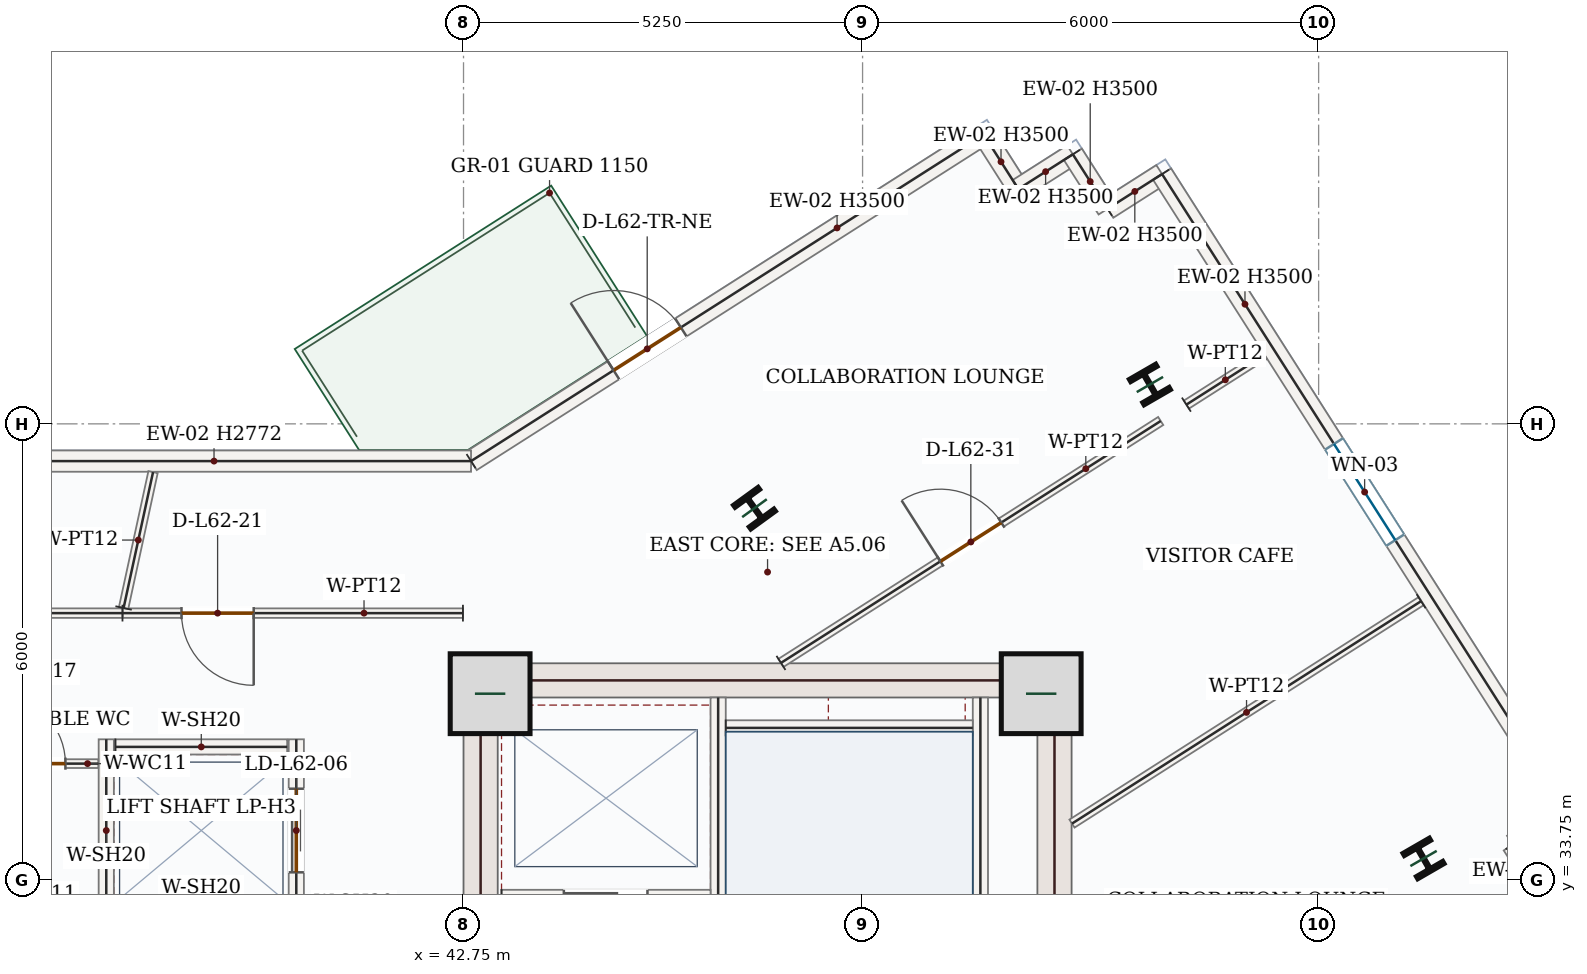
"""IFC4 building model, lengths in metres.
Left out: names, types, materials, properties, quantities, classifications, styles, units other than length and angle.
Written with IfcOpenShell. Run it as: python <this file> out.ifc"""

import sys

from ifc_helpers import new_model, si_unit, direction, frame, frame_2d, origin, origin_2d, place, context, subcontext, project, spatial, rectangle, i_section, extrude, source, transform, mapped, element, fill, save


model = new_model("IFC4")
c1 = context("Model", 3, precision=1e-05, world=origin(), true_north=direction((0.0, 1.0)))
c2 = subcontext(c1, "Body", "Model", "MODEL_VIEW")
j1 = project(units=[si_unit("LENGTHUNIT", "METRE"), si_unit("PLANEANGLEUNIT", "RADIAN")], contexts=[c1])
p1 = place(None, origin())
s1 = spatial("IfcSite", under=j1, at=p1, CompositionType="ELEMENT")
p2 = place(p1, origin())
s2 = spatial("IfcBuilding", under=s1, at=p2, CompositionType="ELEMENT")
p3 = place(p2, frame((0.0, 0.0, 261.6)))
s3 = spatial("IfcBuildingStorey", under=s2, at=p3, CompositionType="ELEMENT", Elevation=261.6)
p4 = place(p3, frame((42.975, 28.05, 0.0), z_axis=(0.0, 0.0, 1.0), x_axis=(0.0, 1.0, 0.0)))
e1 = element("IfcWall", 1, at=p4, inside=s3, PredefinedType="SHEAR", context=c2, shape_type="SweptSolid", body=[
    extrude(rectangle(XDim=8.55, YDim=0.45, at=frame_2d((4.275, 0.0))), origin(), (0.0, 0.0, 1.0), 3.5),
])
p5 = place(p4, frame((1.5, 0.0, 0.0)))
e2 = element("IfcOpeningElement", 2, at=p5, cuts=e1, PredefinedType="OPENING", context=c2, shape_type="SweptSolid", body=[
    extrude(rectangle(XDim=1.1, YDim=2.2, at=frame_2d((0.55, 1.1))), frame((0.0, 0.235, 0.0), z_axis=(0.0, -1.0, 0.0), x_axis=(1.0, 0.0, 0.0)), (0.0, 0.0, 1.0), 0.47),
])
m1 = source(origin(), c2, "Body", "SweptSolid", [
    extrude(rectangle(XDim=8.55, YDim=0.45, at=frame_2d((4.275, 0.0))), origin(), (0.0, 0.0, 1.0), 3.5),
])
p6 = place(p3, frame((50.525, 28.05, 0.0), z_axis=(0.0, 0.0, 1.0), x_axis=(0.0, 1.0, 0.0)))
e3 = element("IfcWall", 3, at=p6, inside=s3, PredefinedType="SHEAR", context=c2, shape_type="MappedRepresentation", body=[
    mapped(m1, transform((0.0, 0.0, 0.0), x_axis=(1.0, 0.0, 0.0), y_axis=(0.0, 1.0, 0.0), z_axis=(0.0, 0.0, 1.0), scale=1.0)),
])
m2 = source(origin(), c2, "Body", "SweptSolid", [
    extrude(rectangle(XDim=7.1, YDim=0.45, at=frame_2d((3.55, 0.0))), origin(), (0.0, 0.0, 1.0), 3.5),
])
p7 = place(p3, frame((43.2, 36.375, 0.0), z_axis=(0.0, 0.0, 1.0), x_axis=(1.0, 0.0, 0.0)))
e4 = element("IfcWall", 4, at=p7, inside=s3, PredefinedType="SHEAR", context=c2, shape_type="MappedRepresentation", body=[
    mapped(m2, transform((0.0, 0.0, 0.0), x_axis=(1.0, 0.0, 0.0), y_axis=(0.0, 1.0, 0.0), z_axis=(0.0, 0.0, 1.0), scale=1.0)),
])
m3 = source(origin(), c2, "Body", "SweptSolid", [
    extrude(rectangle(XDim=1.05, YDim=1.05, at=origin_2d()), origin(), (0.0, 0.0, 1.0), 3.75),
])
for number, where, z_axis, x_axis in (
    (5, (43.1, 36.2, 0.0), (0.0, 0.0, 1.0), (1.0, 0.0, 0.0)),
    (6, (50.35, 36.2, 0.0), (0.0, 0.0, 1.0), (1.0, 0.0, 0.0)),
):
    element("IfcColumn", number, at=place(p3, frame(where, z_axis=z_axis, x_axis=x_axis)), inside=s3, PredefinedType="COLUMN", context=c2, shape_type="MappedRepresentation", body=[
        mapped(m3, transform((0.0, 0.0, 0.0), x_axis=(1.0, 0.0, 0.0), y_axis=(0.0, 1.0, 0.0), z_axis=(0.0, 0.0, 1.0), scale=1.0)),
    ])
m4 = source(origin(), c2, "Body", "SweptSolid", [
    extrude(i_section(OverallWidth=0.399, OverallDepth=0.386, WebThickness=0.021, FlangeThickness=0.033, FilletRadius=0.018, at=origin_2d()), origin(), (0.0, 0.0, 1.0), 3.75),
])
for number, where, z_axis, x_axis in (
    (7, (46.578, 38.641, 0.0), (0.0, 0.0, 1.0), (0.809, 0.588, 0.0)),
    (8, (55.38, 34.032, 0.0), (0.0, 0.0, 1.0), (0.866, 0.5, 0.0)),
    (9, (51.78, 40.268, 0.0), (0.0, 0.0, 1.0), (0.866, 0.5, 0.0)),
):
    element("IfcColumn", number, at=place(p3, frame(where, z_axis=z_axis, x_axis=x_axis)), inside=s3, PredefinedType="COLUMN", context=c2, shape_type="MappedRepresentation", body=[
        mapped(m4, transform((0.0, 0.0, 0.0), x_axis=(1.0, 0.0, 0.0), y_axis=(0.0, 1.0, 0.0), z_axis=(0.0, 0.0, 1.0), scale=1.0)),
    ])
p8 = place(p3, frame((42.849, 39.26, 0.0), z_axis=(0.0, 0.0, 1.0), x_axis=(0.843388565396, 0.537304129669, 0.0)))
e10 = element("IfcWall", 10, at=p8, inside=s3, PredefinedType="SOLIDWALL", context=c2, shape_type="SweptSolid", body=[
    extrude(rectangle(XDim=7.996, YDim=0.28, at=frame_2d((3.998, 0.0))), origin(), (0.0, 0.0, 1.0), 3.5),
])
p9 = place(p8, frame((2.223, 0.0, 0.0)))
e11 = element("IfcOpeningElement", 11, at=p9, cuts=e10, PredefinedType="OPENING", context=c2, shape_type="SweptSolid", body=[
    extrude(rectangle(XDim=1.05, YDim=2.15, at=frame_2d((0.525, 1.075))), frame((0.0, 0.15, 0.0), z_axis=(0.0, -1.0, 0.0), x_axis=(1.0, 0.0, 0.0)), (0.0, 0.0, 1.0), 0.3),
])
m5 = source(origin(), c2, "Body", "SweptSolid", [
    extrude(rectangle(XDim=0.85, YDim=0.28, at=frame_2d((0.425, 0.0))), origin(), (0.0, 0.0, 1.0), 3.5),
])
for number, where, z_axis, x_axis in (
    (12, (49.593, 43.556, 0.0), (0.0, 0.0, 1.0), (0.537, -0.843, 0.0)),
    (13, (50.05, 42.84, 0.0), (0.0, 0.0, 1.0), (0.843, 0.537, 0.0)),
    (14, (50.767, 43.296, 0.0), (0.0, 0.0, 1.0), (0.537, -0.843, 0.0)),
    (15, (51.223, 42.579, 0.0), (0.0, 0.0, 1.0), (0.843, 0.537, 0.0)),
):
    element("IfcWall", number, at=place(p3, frame(where, z_axis=z_axis, x_axis=x_axis)), inside=s3, PredefinedType="SOLIDWALL", context=c2, shape_type="MappedRepresentation", body=[
        mapped(m5, transform((0.0, 0.0, 0.0), x_axis=(1.0, 0.0, 0.0), y_axis=(0.0, 1.0, 0.0), z_axis=(0.0, 0.0, 1.0), scale=1.0)),
    ])
p10 = place(p3, frame((51.94, 43.036, 0.0), z_axis=(0.0, 0.0, 1.0), x_axis=(0.537314949054, -0.843381672508, 0.0)))
e16 = element("IfcWall", 16, at=p10, inside=s3, PredefinedType="SOLIDWALL", context=c2, shape_type="SweptSolid", body=[
    extrude(rectangle(XDim=9.92, YDim=0.28, at=frame_2d((4.96, 0.0))), origin(), (0.0, 0.0, 1.0), 3.5),
])
p11 = place(p10, frame((4.21, 0.0, 0.85)))
e17 = element("IfcOpeningElement", 17, at=p11, cuts=e16, PredefinedType="OPENING", context=c2, shape_type="SweptSolid", body=[
    extrude(rectangle(XDim=1.5, YDim=1.5, at=frame_2d((0.75, 0.75))), frame((0.0, 0.15, 0.0), z_axis=(0.0, -1.0, 0.0), x_axis=(1.0, 0.0, 0.0)), (0.0, 0.0, 1.0), 0.3),
])
m6 = source(origin(), c2, "Body", "SweptSolid", [
    extrude(rectangle(XDim=0.85, YDim=0.28, at=frame_2d((0.425, 0.0))), origin(), (0.0, 0.0, 1.0), 3.5),
])
p12 = place(p3, frame((57.27, 34.67, 0.0), z_axis=(0.0, 0.0, 1.0), x_axis=(-0.843401251716, -0.537284215853, 0.0)))
e18 = element("IfcWall", 18, at=p12, inside=s3, PredefinedType="SOLIDWALL", context=c2, shape_type="MappedRepresentation", body=[
    mapped(m6, transform((0.0, 0.0, 0.0), x_axis=(1.0, 0.0, 0.0), y_axis=(0.0, 1.0, 0.0), z_axis=(0.0, 0.0, 1.0), scale=1.0)),
])
for number, where, z_axis, x_axis in (
    (19, (56.553, 34.213, 0.0), (0.0, 0.0, 1.0), (0.537, -0.843, 0.0)),
    (20, (57.01, 33.496, 0.0), (0.0, 0.0, 1.0), (-0.843, -0.537, 0.0)),
):
    element("IfcWall", number, at=place(p3, frame(where, z_axis=z_axis, x_axis=x_axis)), inside=s3, PredefinedType="SOLIDWALL", context=c2, shape_type="MappedRepresentation", body=[
        mapped(m5, transform((0.0, 0.0, 0.0), x_axis=(1.0, 0.0, 0.0), y_axis=(0.0, 1.0, 0.0), z_axis=(0.0, 0.0, 1.0), scale=1.0)),
    ])
m7 = source(origin(), c2, "Body", "SweptSolid", [
    extrude(rectangle(XDim=6.763, YDim=0.28, at=frame_2d((3.381, 0.0))), origin(), (0.0, 0.0, 1.0), 2.772),
])
p13 = place(p3, frame((36.086, 39.26, 0.0), z_axis=(0.0, 0.0, 1.0), x_axis=(1.0, 0.0, 0.0)))
e21 = element("IfcWall", 21, at=p13, inside=s3, PredefinedType="SOLIDWALL", context=c2, shape_type="MappedRepresentation", body=[
    mapped(m7, transform((0.0, 0.0, 0.0), x_axis=(1.0, 0.0, 0.0), y_axis=(0.0, 1.0, 0.0), z_axis=(0.0, 0.0, 1.0), scale=1.0)),
])
m8 = source(origin(), c2, "Body", "SweptSolid", [
    extrude(rectangle(XDim=7.87, YDim=0.2, at=frame_2d((3.935, 0.0))), origin(), (0.0, 0.0, 1.0), 3.5),
])
p14 = place(p3, frame((49.55, 28.28, 0.0), z_axis=(0.0, 0.0, 1.0), x_axis=(0.0, 1.0, 0.0)))
e22 = element("IfcWall", 22, at=p14, inside=s3, PredefinedType="SOLIDWALL", context=c2, shape_type="MappedRepresentation", body=[
    mapped(m8, transform((0.0, 0.0, 0.0), x_axis=(1.0, 0.0, 0.0), y_axis=(0.0, 1.0, 0.0), z_axis=(0.0, 0.0, 1.0), scale=1.0)),
])
p15 = place(p3, frame((46.1, 28.15, 0.0), z_axis=(0.0, 0.0, 1.0), x_axis=(0.0, 1.0, 0.0)))
e23 = element("IfcWall", 23, at=p15, inside=s3, PredefinedType="SOLIDWALL", context=c2, shape_type="SweptSolid", body=[
    extrude(rectangle(XDim=8.0, YDim=0.2, at=frame_2d((4.0, 0.0))), origin(), (0.0, 0.0, 1.0), 3.5),
])
p16 = place(p15, frame((0.4, 0.0, 0.0)))
e24 = element("IfcOpeningElement", 24, at=p16, cuts=e23, PredefinedType="OPENING", context=c2, shape_type="SweptSolid", body=[
    extrude(rectangle(XDim=1.05, YDim=2.15, at=frame_2d((0.525, 1.075))), frame((0.0, 0.11, 0.0), z_axis=(0.0, -1.0, 0.0), x_axis=(1.0, 0.0, 0.0)), (0.0, 0.0, 1.0), 0.22),
])
m9 = source(origin(), c2, "Body", "SweptSolid", [
    extrude(rectangle(XDim=3.25, YDim=0.2, at=frame_2d((1.625, 0.0))), origin(), (0.0, 0.0, 1.0), 3.5),
])
p17 = place(p3, frame((46.2, 35.75, 0.0), z_axis=(0.0, 0.0, 1.0), x_axis=(1.0, 0.0, 0.0)))
e25 = element("IfcWall", 25, at=p17, inside=s3, PredefinedType="SOLIDWALL", context=c2, shape_type="MappedRepresentation", body=[
    mapped(m9, transform((0.0, 0.0, 0.0), x_axis=(1.0, 0.0, 0.0), y_axis=(0.0, 1.0, 0.0), z_axis=(0.0, 0.0, 1.0), scale=1.0)),
])
p18 = place(p3, frame((43.25, 33.52, 0.0), z_axis=(0.0, 0.0, 1.0), x_axis=(1.0, 0.0, 0.0)))
e26 = element("IfcWall", 26, at=p18, inside=s3, PredefinedType="SOLIDWALL", context=c2, shape_type="SweptSolid", body=[
    extrude(rectangle(XDim=2.75, YDim=0.2, at=frame_2d((1.375, 0.0))), origin(), (0.0, 0.0, 1.0), 3.5),
])
p19 = place(p18, frame((0.82, 0.0, 0.0)))
e27 = element("IfcOpeningElement", 27, at=p19, cuts=e26, PredefinedType="OPENING", context=c2, shape_type="SweptSolid", body=[
    extrude(rectangle(XDim=1.1, YDim=2.15, at=frame_2d((0.55, 1.075))), frame((0.0, 0.11, 0.0), z_axis=(0.0, -1.0, 0.0), x_axis=(1.0, 0.0, 0.0)), (0.0, 0.0, 1.0), 0.22),
])
m10 = source(origin(), c2, "Body", "SweptSolid", [
    extrude(rectangle(XDim=2.4, YDim=0.2, at=frame_2d((1.2, 0.0))), origin(), (0.0, 0.0, 1.0), 3.5),
])
p20 = place(p3, frame((38.05, 33.2, 0.0), z_axis=(0.0, 0.0, 1.0), x_axis=(0.0, 1.0, 0.0)))
e28 = element("IfcWall", 28, at=p20, inside=s3, PredefinedType="SOLIDWALL", context=c2, shape_type="MappedRepresentation", body=[
    mapped(m10, transform((0.0, 0.0, 0.0), x_axis=(1.0, 0.0, 0.0), y_axis=(0.0, 1.0, 0.0), z_axis=(0.0, 0.0, 1.0), scale=1.0)),
])
p21 = place(p3, frame((40.55, 33.2, 0.0), z_axis=(0.0, 0.0, 1.0), x_axis=(0.0, 1.0, 0.0)))
e29 = element("IfcWall", 29, at=p21, inside=s3, PredefinedType="SOLIDWALL", context=c2, shape_type="SweptSolid", body=[
    extrude(rectangle(XDim=2.4, YDim=0.2, at=frame_2d((1.2, 0.0))), origin(), (0.0, 0.0, 1.0), 3.5),
])
p22 = place(p21, frame((0.65, 0.0, 0.0)))
e30 = element("IfcOpeningElement", 30, at=p22, cuts=e29, PredefinedType="OPENING", context=c2, shape_type="SweptSolid", body=[
    extrude(rectangle(XDim=1.1, YDim=2.15, at=frame_2d((0.55, 1.075))), frame((0.0, 0.11, 0.0), z_axis=(0.0, -1.0, 0.0), x_axis=(1.0, 0.0, 0.0)), (0.0, 0.0, 1.0), 0.22),
])
m11 = source(origin(), c2, "Body", "SweptSolid", [
    extrude(rectangle(XDim=2.26, YDim=0.2, at=frame_2d((1.13, 0.0))), origin(), (0.0, 0.0, 1.0), 3.5),
])
p23 = place(p3, frame((38.17, 35.5, 0.0), z_axis=(0.0, 0.0, 1.0), x_axis=(1.0, 0.0, 0.0)))
e31 = element("IfcWall", 31, at=p23, inside=s3, PredefinedType="SOLIDWALL", context=c2, shape_type="MappedRepresentation", body=[
    mapped(m11, transform((0.0, 0.0, 0.0), x_axis=(1.0, 0.0, 0.0), y_axis=(0.0, 1.0, 0.0), z_axis=(0.0, 0.0, 1.0), scale=1.0)),
])
p24 = place(p3, frame((36.472, 35.28, 0.0), z_axis=(0.0, 0.0, 1.0), x_axis=(1.0, 0.0, 0.0)))
e32 = element("IfcWall", 32, at=p24, inside=s3, PredefinedType="PARTITIONING", context=c2, shape_type="SweptSolid", body=[
    extrude(rectangle(XDim=1.473, YDim=0.115, at=frame_2d((0.736, 0.0))), origin(), (0.0, 0.0, 1.0), 3.5),
])
p25 = place(p24, frame((0.14, 0.0, 0.0)))
e33 = element("IfcOpeningElement", 33, at=p25, cuts=e32, PredefinedType="OPENING", context=c2, shape_type="SweptSolid", body=[
    extrude(rectangle(XDim=0.9, YDim=2.1, at=frame_2d((0.45, 1.05))), frame((0.0, 0.067, 0.0), z_axis=(0.0, -1.0, 0.0), x_axis=(1.0, 0.0, 0.0)), (0.0, 0.0, 1.0), 0.135),
])
p26 = place(p3, frame((46.927, 36.605, 0.0), z_axis=(0.0, 0.0, 1.0), x_axis=(0.843398332862, 0.537288797693, 0.0)))
e34 = element("IfcWall", 34, at=p26, inside=s3, PredefinedType="PARTITIONING", context=c2, shape_type="SweptSolid", body=[
    extrude(rectangle(XDim=5.924, YDim=0.125, at=frame_2d((2.962, 0.0))), origin(), (0.0, 0.0, 1.0), 3.5),
])
p27 = place(p26, frame((2.487, 0.0, 0.0)))
e35 = element("IfcOpeningElement", 35, at=p27, cuts=e34, PredefinedType="OPENING", context=c2, shape_type="SweptSolid", body=[
    extrude(rectangle(XDim=0.95, YDim=2.15, at=frame_2d((0.475, 1.075))), frame((0.0, 0.073, 0.0), z_axis=(0.0, -1.0, 0.0), x_axis=(1.0, 0.0, 0.0)), (0.0, 0.0, 1.0), 0.145),
])
m12 = source(origin(), c2, "Body", "SweptSolid", [
    extrude(rectangle(XDim=1.215, YDim=0.125, at=frame_2d((0.607, 0.0))), origin(), (0.0, 0.0, 1.0), 3.5),
])
p28 = place(p3, frame((52.26, 40.003, 0.0), z_axis=(0.0, 0.0, 1.0), x_axis=(0.84340481812, 0.537278617453, 0.0)))
e36 = element("IfcWall", 36, at=p28, inside=s3, PredefinedType="PARTITIONING", context=c2, shape_type="MappedRepresentation", body=[
    mapped(m12, transform((0.0, 0.0, 0.0), x_axis=(1.0, 0.0, 0.0), y_axis=(0.0, 1.0, 0.0), z_axis=(0.0, 0.0, 1.0), scale=1.0)),
])
m13 = source(origin(), c2, "Body", "SweptSolid", [
    extrude(rectangle(XDim=5.446, YDim=0.125, at=frame_2d((2.723, 0.0))), origin(), (0.0, 0.0, 1.0), 3.5),
])
p29 = place(p3, frame((55.348, 37.417, 0.0), z_axis=(0.0, 0.0, 1.0), x_axis=(-0.843395566027, -0.537293140851, 0.0)))
e37 = element("IfcWall", 37, at=p29, inside=s3, PredefinedType="PARTITIONING", context=c2, shape_type="MappedRepresentation", body=[
    mapped(m13, transform((0.0, 0.0, 0.0), x_axis=(1.0, 0.0, 0.0), y_axis=(0.0, 1.0, 0.0), z_axis=(0.0, 0.0, 1.0), scale=1.0)),
])
p30 = place(p3, frame((42.742, 37.26, 0.0), z_axis=(0.0, 0.0, 1.0), x_axis=(-0.999999998515, 5.4504824e-05, 0.0)))
e38 = element("IfcWall", 38, at=p30, inside=s3, PredefinedType="PARTITIONING", context=c2, shape_type="SweptSolid", body=[
    extrude(rectangle(XDim=4.479, YDim=0.125, at=frame_2d((2.24, 0.0))), origin(), (0.0, 0.0, 1.0), 3.5),
])
p31 = place(p30, frame((2.753, 0.0, 0.0)))
e39 = element("IfcOpeningElement", 39, at=p31, cuts=e38, PredefinedType="OPENING", context=c2, shape_type="SweptSolid", body=[
    extrude(rectangle(XDim=0.95, YDim=2.15, at=frame_2d((0.475, 1.075))), frame((0.0, 0.073, 0.0), z_axis=(0.0, -1.0, 0.0), x_axis=(1.0, 0.0, 0.0)), (0.0, 0.0, 1.0), 0.145),
])
m14 = source(origin(), c2, "Body", "SweptSolid", [
    extrude(rectangle(XDim=1.829, YDim=0.125, at=frame_2d((0.915, 0.0))), origin(), (0.0, 0.0, 1.0), 3.5),
])
p32 = place(p3, frame((38.278, 37.327, 0.0), z_axis=(0.0, 0.0, 1.0), x_axis=(0.21182559105, 0.977307484355, 0.0)))
e40 = element("IfcWall", 40, at=p32, inside=s3, PredefinedType="PARTITIONING", context=c2, shape_type="MappedRepresentation", body=[
    mapped(m14, transform((0.0, 0.0, 0.0), x_axis=(1.0, 0.0, 0.0), y_axis=(0.0, 1.0, 0.0), z_axis=(0.0, 0.0, 1.0), scale=1.0)),
])
p33 = place(p3, frame((38.263, 37.26, 0.0), z_axis=(0.0, 0.0, 1.0), x_axis=(-1.0, 0.0, 0.0)))
e41 = element("IfcWall", 41, at=p33, inside=s3, PredefinedType="PARTITIONING", context=c2, shape_type="SweptSolid", body=[
    extrude(rectangle(XDim=6.867, YDim=0.125, at=frame_2d((3.434, 0.0))), origin(), (0.0, 0.0, 1.0), 3.5),
])
p34 = place(p33, frame((2.071, 0.0, 0.0)))
e42 = element("IfcOpeningElement", 42, at=p34, cuts=e41, PredefinedType="OPENING", context=c2, shape_type="SweptSolid", body=[
    extrude(rectangle(XDim=0.95, YDim=2.15, at=frame_2d((0.475, 1.075))), frame((0.0, 0.073, 0.0), z_axis=(0.0, -1.0, 0.0), x_axis=(1.0, 0.0, 0.0)), (0.0, 0.0, 1.0), 0.145),
])
m15 = source(origin(), c2, "Body", "SweptSolid", [
    extrude(rectangle(XDim=1.05, YDim=2.15, at=frame_2d((0.525, 1.075))), frame((0.0, 0.025, 0.0), z_axis=(0.0, -1.0, 0.0), x_axis=(1.0, 0.0, 0.0)), (0.0, 0.0, 1.0), 0.05),
])
p35 = place(p9, origin())
e43 = element("IfcDoor", 43, at=p35, inside=s3, OperationType="SINGLE_SWING_LEFT", PredefinedType="DOOR", context=c2, shape_type="MappedRepresentation", body=[
    mapped(m15, transform((0.0, 0.0, 0.0), x_axis=(1.0, 0.0, 0.0), y_axis=(0.0, 1.0, 0.0), z_axis=(0.0, 0.0, 1.0), scale=1.0)),
])
fill(e11, e43)
m16 = source(origin(), c2, "Body", "SweptSolid", [
    extrude(rectangle(XDim=1.5, YDim=1.5, at=frame_2d((0.75, 0.75))), frame((0.0, 0.03, 0.0), z_axis=(0.0, -1.0, 0.0), x_axis=(1.0, 0.0, 0.0)), (0.0, 0.0, 1.0), 0.06),
])
p36 = place(p11, origin())
e44 = element("IfcWindow", 44, at=p36, inside=s3, PartitioningType="SINGLE_PANEL", PredefinedType="WINDOW", context=c2, shape_type="MappedRepresentation", body=[
    mapped(m16, transform((0.0, 0.0, 0.0), x_axis=(1.0, 0.0, 0.0), y_axis=(0.0, 1.0, 0.0), z_axis=(0.0, 0.0, 1.0), scale=1.0)),
])
fill(e17, e44)
m17 = source(origin(), c2, "Body", "SweptSolid", [
    extrude(rectangle(XDim=1.1, YDim=2.15, at=frame_2d((0.55, 1.075))), frame((0.0, 0.025, 0.0), z_axis=(0.0, -1.0, 0.0), x_axis=(1.0, 0.0, 0.0)), (0.0, 0.0, 1.0), 0.05),
])
p37 = place(p22, origin())
e45 = element("IfcDoor", 45, at=p37, inside=s3, OperationType="DOUBLE_DOOR_SLIDING", PredefinedType="DOOR", context=c2, shape_type="MappedRepresentation", body=[
    mapped(m17, transform((0.0, 0.0, 0.0), x_axis=(1.0, 0.0, 0.0), y_axis=(0.0, 1.0, 0.0), z_axis=(0.0, 0.0, 1.0), scale=1.0)),
])
fill(e30, e45)
m18 = source(origin(), c2, "Body", "SweptSolid", [
    extrude(rectangle(XDim=0.9, YDim=2.1, at=frame_2d((0.45, 1.05))), frame((0.0, 0.025, 0.0), z_axis=(0.0, -1.0, 0.0), x_axis=(1.0, 0.0, 0.0)), (0.0, 0.0, 1.0), 0.05),
])
p38 = place(p25, origin())
e46 = element("IfcDoor", 46, at=p38, inside=s3, OperationType="SINGLE_SWING_LEFT", PredefinedType="DOOR", context=c2, shape_type="MappedRepresentation", body=[
    mapped(m18, transform((0.0, 0.0, 0.0), x_axis=(1.0, 0.0, 0.0), y_axis=(0.0, 1.0, 0.0), z_axis=(0.0, 0.0, 1.0), scale=1.0)),
])
fill(e33, e46)
m19 = source(origin(), c2, "Body", "SweptSolid", [
    extrude(rectangle(XDim=0.95, YDim=2.15, at=frame_2d((0.475, 1.075))), frame((0.0, 0.025, 0.0), z_axis=(0.0, -1.0, 0.0), x_axis=(1.0, 0.0, 0.0)), (0.0, 0.0, 1.0), 0.05),
])
p39 = place(p31, origin())
e47 = element("IfcDoor", 47, at=p39, inside=s3, OperationType="SINGLE_SWING_LEFT", PredefinedType="DOOR", context=c2, shape_type="MappedRepresentation", body=[
    mapped(m19, transform((0.0, 0.0, 0.0), x_axis=(1.0, 0.0, 0.0), y_axis=(0.0, 1.0, 0.0), z_axis=(0.0, 0.0, 1.0), scale=1.0)),
])
fill(e39, e47)
p40 = place(p27, origin())
e48 = element("IfcDoor", 48, at=p40, inside=s3, OperationType="SINGLE_SWING_LEFT", PredefinedType="DOOR", context=c2, shape_type="MappedRepresentation", body=[
    mapped(m19, transform((0.0, 0.0, 0.0), x_axis=(1.0, 0.0, 0.0), y_axis=(0.0, 1.0, 0.0), z_axis=(0.0, 0.0, 1.0), scale=1.0)),
])
fill(e35, e48)
save(model, sys.argv[1])
